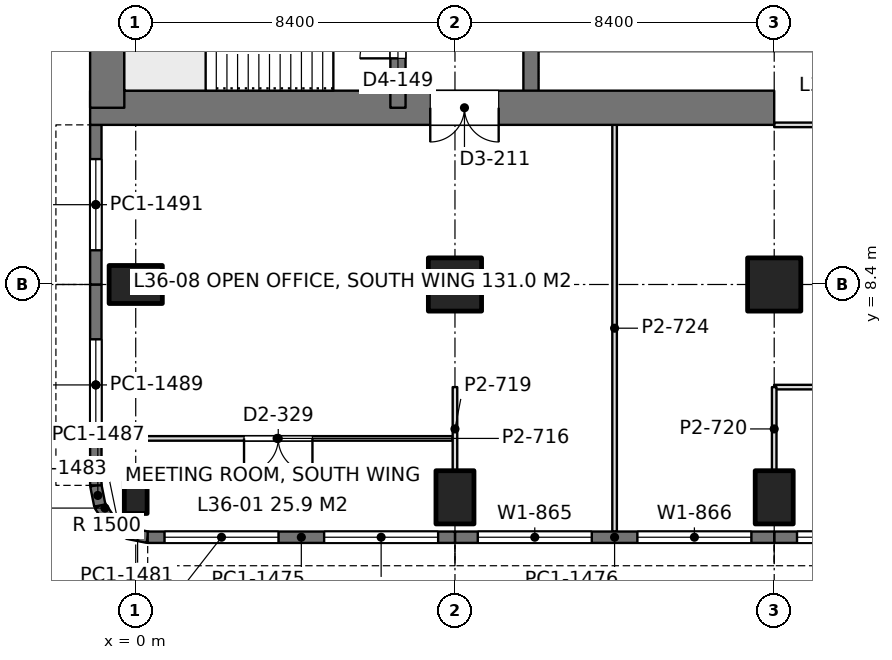
"""IFC4 building model, lengths in metres.
Left out: names, types, materials, properties, quantities, classifications, styles, units other than length and angle.
Written with IfcOpenShell. Run it as: python <this file> out.ifc"""

import sys

from ifc_helpers import new_model, si_unit, direction, frame, frame_2d, origin, origin_2d, place, context, subcontext, project, spatial, rectangle, extrude, element, fill, save


model = new_model("IFC4")
c1 = context("Model", 3, precision=1e-05, world=origin(), true_north=direction((0.0, 1.0)))
c2 = subcontext(c1, "Body", "Model", "MODEL_VIEW")
j1 = project(units=[si_unit("LENGTHUNIT", "METRE"), si_unit("PLANEANGLEUNIT", "RADIAN")], contexts=[c1])
p1 = place(None, origin())
s1 = spatial("IfcSite", under=j1, at=p1, CompositionType="ELEMENT")
p2 = place(p1, origin())
s2 = spatial("IfcBuilding", under=s1, at=p2, CompositionType="ELEMENT")
p3 = place(p2, frame((0.0, 0.0, 159.6)))
s3 = spatial("IfcBuildingStorey", under=s2, at=p3, CompositionType="ELEMENT", Elevation=159.6)
p4 = place(p3, frame((0.0, 2.8, 0.0), z_axis=(0.0, 0.0, 1.0), x_axis=(1.0, 0.0, 0.0)))
e1 = element("IfcColumn", 1, at=p4, inside=s3, PredefinedType="COLUMN", context=c2, shape_type="SweptSolid", body=[
    extrude(rectangle(XDim=0.6, YDim=0.85, at=origin_2d()), origin(), (0.0, 0.0, 1.0), 4.2),
])
for number, where, z_axis, x_axis in (
    (2, (0.0, 8.4, 0.0), (0.0, 0.0, 1.0), (0.0, 1.0, 0.0)),
    (3, (8.4, 2.8, 0.0), (0.0, 0.0, 1.0), (1.0, 0.0, 0.0)),
):
    element("IfcColumn", number, at=place(p3, frame(where, z_axis=z_axis, x_axis=x_axis)), inside=s3, PredefinedType="COLUMN", context=c2, shape_type="SweptSolid", body=[
        extrude(rectangle(XDim=1.0, YDim=1.4, at=origin_2d()), origin(), (0.0, 0.0, 1.0), 4.2),
    ])
p5 = place(p3, frame((8.4, 8.4, 0.0), z_axis=(0.0, 0.0, 1.0), x_axis=(1.0, 0.0, 0.0)))
e4 = element("IfcColumn", 4, at=p5, inside=s3, PredefinedType="COLUMN", context=c2, shape_type="SweptSolid", body=[
    extrude(rectangle(XDim=1.4, YDim=1.4, at=origin_2d()), origin(), (0.0, 0.0, 1.0), 4.2),
])
p6 = place(p3, frame((16.8, 2.8, 0.0), z_axis=(0.0, 0.0, 1.0), x_axis=(1.0, 0.0, 0.0)))
e5 = element("IfcColumn", 5, at=p6, inside=s3, PredefinedType="COLUMN", context=c2, shape_type="SweptSolid", body=[
    extrude(rectangle(XDim=1.0, YDim=1.4, at=origin_2d()), origin(), (0.0, 0.0, 1.0), 4.2),
])
p7 = place(p3, frame((16.8, 8.4, 0.0), z_axis=(0.0, 0.0, 1.0), x_axis=(1.0, 0.0, 0.0)))
e6 = element("IfcColumn", 6, at=p7, inside=s3, PredefinedType="COLUMN", context=c2, shape_type="SweptSolid", body=[
    extrude(rectangle(XDim=1.4, YDim=1.4, at=origin_2d()), origin(), (0.0, 0.0, 1.0), 4.2),
])
p8 = place(p3, frame((-1.2, 13.05, 0.0), z_axis=(0.0, 0.0, 1.0), x_axis=(1.0, 0.0, 0.0)))
e7 = element("IfcWall", 7, at=p8, inside=s3, PredefinedType="SHEAR", context=c2, shape_type="SweptSolid", body=[
    extrude(rectangle(XDim=18.0, YDim=0.9, at=frame_2d((9.0, 0.0))), origin(), (0.0, 0.0, 1.0), 4.2),
])
p9 = place(p8, frame((8.95, 0.0, 0.0)))
e8 = element("IfcOpeningElement", 8, at=p9, cuts=e7, PredefinedType="OPENING", context=c2, shape_type="SweptSolid", body=[
    extrude(rectangle(XDim=1.8, YDim=2.4, at=frame_2d((0.9, 1.2))), frame((0.0, 0.46, 0.0), z_axis=(0.0, -1.0, 0.0), x_axis=(1.0, 0.0, 0.0)), (0.0, 0.0, 1.0), 0.92),
])
p10 = place(p3, frame((-0.75, 13.05, 0.0), z_axis=(0.0, 0.0, 1.0), x_axis=(0.0, 1.0, 0.0)))
e9 = element("IfcWall", 9, at=p10, inside=s3, PredefinedType="SHEAR", context=c2, shape_type="SweptSolid", body=[
    extrude(rectangle(XDim=24.3, YDim=0.9, at=frame_2d((12.15, 0.0))), origin(), (0.0, 0.0, 1.0), 4.2),
])
p11 = place(p3, frame((6.9, 13.05, 0.0), z_axis=(0.0, 0.0, 1.0), x_axis=(0.0, 1.0, 0.0)))
e10 = element("IfcWall", 10, at=p11, inside=s3, PredefinedType="SHEAR", context=c2, shape_type="SweptSolid", body=[
    extrude(rectangle(XDim=24.3, YDim=0.4, at=frame_2d((12.15, 0.0))), origin(), (0.0, 0.0, 1.0), 4.2),
])
p12 = place(p11, frame((1.3, 0.0, 0.0)))
e11 = element("IfcOpeningElement", 11, at=p12, cuts=e10, PredefinedType="OPENING", context=c2, shape_type="SweptSolid", body=[
    extrude(rectangle(XDim=1.0, YDim=2.2, at=frame_2d((0.5, 1.1))), frame((0.0, 0.21, 0.0), z_axis=(0.0, -1.0, 0.0), x_axis=(1.0, 0.0, 0.0)), (0.0, 0.0, 1.0), 0.42),
])
p13 = place(p11, frame((22.0, 0.0, 0.0)))
e12 = element("IfcOpeningElement", 12, at=p13, cuts=e10, PredefinedType="OPENING", context=c2, shape_type="SweptSolid", body=[
    extrude(rectangle(XDim=1.0, YDim=2.2, at=frame_2d((0.5, 1.1))), frame((0.0, 0.21, 0.0), z_axis=(0.0, -1.0, 0.0), x_axis=(1.0, 0.0, 0.0)), (0.0, 0.0, 1.0), 0.42),
])
p14 = place(p11, frame((5.55, 0.0, 0.0)))
e13 = element("IfcOpeningElement", 13, at=p14, cuts=e10, PredefinedType="OPENING", context=c2, shape_type="SweptSolid", body=[
    extrude(rectangle(XDim=1.0, YDim=2.2, at=frame_2d((0.5, 1.1))), frame((0.0, 0.21, 0.0), z_axis=(0.0, -1.0, 0.0), x_axis=(1.0, 0.0, 0.0)), (0.0, 0.0, 1.0), 0.42),
])
p15 = place(p11, frame((9.55, 0.0, 0.0)))
e14 = element("IfcOpeningElement", 14, at=p15, cuts=e10, PredefinedType="OPENING", context=c2, shape_type="SweptSolid", body=[
    extrude(rectangle(XDim=1.0, YDim=2.2, at=frame_2d((0.5, 1.1))), frame((0.0, 0.21, 0.0), z_axis=(0.0, -1.0, 0.0), x_axis=(1.0, 0.0, 0.0)), (0.0, 0.0, 1.0), 0.42),
])
p16 = place(p11, frame((12.8, 0.0, 0.0)))
e15 = element("IfcOpeningElement", 15, at=p16, cuts=e10, PredefinedType="OPENING", context=c2, shape_type="SweptSolid", body=[
    extrude(rectangle(XDim=1.1, YDim=2.2, at=frame_2d((0.55, 1.1))), frame((0.0, 0.21, 0.0), z_axis=(0.0, -1.0, 0.0), x_axis=(1.0, 0.0, 0.0)), (0.0, 0.0, 1.0), 0.42),
])
p17 = place(p11, frame((15.538, 0.0, 0.0)))
e16 = element("IfcOpeningElement", 16, at=p17, cuts=e10, PredefinedType="OPENING", context=c2, shape_type="SweptSolid", body=[
    extrude(rectangle(XDim=1.1, YDim=2.2, at=frame_2d((0.55, 1.1))), frame((0.0, 0.21, 0.0), z_axis=(0.0, -1.0, 0.0), x_axis=(1.0, 0.0, 0.0)), (0.0, 0.0, 1.0), 0.42),
])
p18 = place(p11, frame((18.262, 0.0, 0.0)))
e17 = element("IfcOpeningElement", 17, at=p18, cuts=e10, PredefinedType="OPENING", context=c2, shape_type="SweptSolid", body=[
    extrude(rectangle(XDim=1.1, YDim=2.2, at=frame_2d((0.55, 1.1))), frame((0.0, 0.21, 0.0), z_axis=(0.0, -1.0, 0.0), x_axis=(1.0, 0.0, 0.0)), (0.0, 0.0, 1.0), 0.42),
])
p19 = place(p3, frame((10.4, 13.05, 0.0), z_axis=(0.0, 0.0, 1.0), x_axis=(0.0, 1.0, 0.0)))
e18 = element("IfcWall", 18, at=p19, inside=s3, PredefinedType="SHEAR", context=c2, shape_type="SweptSolid", body=[
    extrude(rectangle(XDim=24.3, YDim=0.4, at=frame_2d((12.15, 0.0))), origin(), (0.0, 0.0, 1.0), 4.2),
])
p20 = place(p19, frame((10.05, 0.0, 0.0)))
e19 = element("IfcOpeningElement", 19, at=p20, cuts=e18, PredefinedType="OPENING", context=c2, shape_type="SweptSolid", body=[
    extrude(rectangle(XDim=1.1, YDim=2.2, at=frame_2d((0.55, 1.1))), frame((0.0, 0.21, 0.0), z_axis=(0.0, -1.0, 0.0), x_axis=(1.0, 0.0, 0.0)), (0.0, 0.0, 1.0), 0.42),
])
p21 = place(p19, frame((12.9, 0.0, 0.0)))
e20 = element("IfcOpeningElement", 20, at=p21, cuts=e18, PredefinedType="OPENING", context=c2, shape_type="SweptSolid", body=[
    extrude(rectangle(XDim=1.1, YDim=2.2, at=frame_2d((0.55, 1.1))), frame((0.0, 0.21, 0.0), z_axis=(0.0, -1.0, 0.0), x_axis=(1.0, 0.0, 0.0)), (0.0, 0.0, 1.0), 0.42),
])
p22 = place(p19, frame((21.45, 0.0, 0.0)))
e21 = element("IfcOpeningElement", 21, at=p22, cuts=e18, PredefinedType="OPENING", context=c2, shape_type="SweptSolid", body=[
    extrude(rectangle(XDim=1.1, YDim=2.2, at=frame_2d((0.55, 1.1))), frame((0.0, 0.21, 0.0), z_axis=(0.0, -1.0, 0.0), x_axis=(1.0, 0.0, 0.0)), (0.0, 0.0, 1.0), 0.42),
])
p23 = place(p19, frame((2.05, 0.0, 0.0)))
e22 = element("IfcOpeningElement", 22, at=p23, cuts=e18, PredefinedType="OPENING", context=c2, shape_type="SweptSolid", body=[
    extrude(rectangle(XDim=1.8, YDim=2.4, at=frame_2d((0.9, 1.2))), frame((0.0, 0.21, 0.0), z_axis=(0.0, -1.0, 0.0), x_axis=(1.0, 0.0, 0.0)), (0.0, 0.0, 1.0), 0.42),
])
p24 = place(p19, frame((5.8, 0.0, 0.0)))
e23 = element("IfcOpeningElement", 23, at=p24, cuts=e18, PredefinedType="OPENING", context=c2, shape_type="SweptSolid", body=[
    extrude(rectangle(XDim=1.8, YDim=2.4, at=frame_2d((0.9, 1.2))), frame((0.0, 0.21, 0.0), z_axis=(0.0, -1.0, 0.0), x_axis=(1.0, 0.0, 0.0)), (0.0, 0.0, 1.0), 0.42),
])
p25 = place(p3, frame((25.2, 1.75, 0.0), z_axis=(0.0, 0.0, 1.0), x_axis=(-1.0, 0.0, 0.0)))
e24 = element("IfcWall", 24, at=p25, inside=s3, PredefinedType="SOLIDWALL", context=c2, shape_type="SweptSolid", body=[
    extrude(rectangle(XDim=8.4, YDim=0.3, at=frame_2d((4.2, 0.0))), origin(), (0.0, 0.0, 1.0), 4.05),
])
p26 = place(p25, frame((0.6, 0.0, 0.9)))
e25 = element("IfcOpeningElement", 25, at=p26, cuts=e24, PredefinedType="OPENING", context=c2, shape_type="SweptSolid", body=[
    extrude(rectangle(XDim=3.0, YDim=1.9, at=frame_2d((1.5, 0.95))), frame((0.0, 0.16, 0.0), z_axis=(0.0, -1.0, 0.0), x_axis=(1.0, 0.0, 0.0)), (0.0, 0.0, 1.0), 0.32),
])
p27 = place(p25, frame((4.8, 0.0, 0.9)))
e26 = element("IfcOpeningElement", 26, at=p27, cuts=e24, PredefinedType="OPENING", context=c2, shape_type="SweptSolid", body=[
    extrude(rectangle(XDim=3.0, YDim=1.9, at=frame_2d((1.5, 0.95))), frame((0.0, 0.16, 0.0), z_axis=(0.0, -1.0, 0.0), x_axis=(1.0, 0.0, 0.0)), (0.0, 0.0, 1.0), 0.32),
])
p28 = place(p3, frame((16.8, 1.75, 0.0), z_axis=(0.0, 0.0, 1.0), x_axis=(-1.0, 0.0, 0.0)))
e27 = element("IfcWall", 27, at=p28, inside=s3, PredefinedType="SOLIDWALL", context=c2, shape_type="SweptSolid", body=[
    extrude(rectangle(XDim=8.4, YDim=0.3, at=frame_2d((4.2, 0.0))), origin(), (0.0, 0.0, 1.0), 4.05),
])
p29 = place(p28, frame((0.6, 0.0, 0.9)))
e28 = element("IfcOpeningElement", 28, at=p29, cuts=e27, PredefinedType="OPENING", context=c2, shape_type="SweptSolid", body=[
    extrude(rectangle(XDim=3.0, YDim=1.9, at=frame_2d((1.5, 0.95))), frame((0.0, 0.16, 0.0), z_axis=(0.0, -1.0, 0.0), x_axis=(1.0, 0.0, 0.0)), (0.0, 0.0, 1.0), 0.32),
])
p30 = place(p28, frame((4.8, 0.0, 0.9)))
e29 = element("IfcOpeningElement", 29, at=p30, cuts=e27, PredefinedType="OPENING", context=c2, shape_type="SweptSolid", body=[
    extrude(rectangle(XDim=3.0, YDim=1.9, at=frame_2d((1.5, 0.95))), frame((0.0, 0.16, 0.0), z_axis=(0.0, -1.0, 0.0), x_axis=(1.0, 0.0, 0.0)), (0.0, 0.0, 1.0), 0.32),
])
p31 = place(p3, frame((8.4, 1.75, 0.0), z_axis=(0.0, 0.0, 1.0), x_axis=(-1.0, 0.0, 0.0)))
e30 = element("IfcWall", 30, at=p31, inside=s3, PredefinedType="SOLIDWALL", context=c2, shape_type="SweptSolid", body=[
    extrude(rectangle(XDim=8.085, YDim=0.3, at=frame_2d((4.042, 0.0))), origin(), (0.0, 0.0, 1.0), 4.05),
])
p32 = place(p31, frame((0.443, 0.0, 0.9)))
e31 = element("IfcOpeningElement", 31, at=p32, cuts=e30, PredefinedType="OPENING", context=c2, shape_type="SweptSolid", body=[
    extrude(rectangle(XDim=3.0, YDim=1.9, at=frame_2d((1.5, 0.95))), frame((0.0, 0.16, 0.0), z_axis=(0.0, -1.0, 0.0), x_axis=(1.0, 0.0, 0.0)), (0.0, 0.0, 1.0), 0.32),
])
p33 = place(p31, frame((4.643, 0.0, 0.9)))
e32 = element("IfcOpeningElement", 32, at=p33, cuts=e30, PredefinedType="OPENING", context=c2, shape_type="SweptSolid", body=[
    extrude(rectangle(XDim=3.0, YDim=1.9, at=frame_2d((1.5, 0.95))), frame((0.0, 0.16, 0.0), z_axis=(0.0, -1.0, 0.0), x_axis=(1.0, 0.0, 0.0)), (0.0, 0.0, 1.0), 0.32),
])
p34 = place(p3, frame((0.315, 1.75, 0.0), z_axis=(0.0, 0.0, 1.0), x_axis=(-0.980788534345, 0.195073962632, 0.0)))
e33 = element("IfcWall", 33, at=p34, inside=s3, PredefinedType="SOLIDWALL", context=c2, shape_type="SweptSolid", body=[
    extrude(rectangle(XDim=0.541, YDim=0.3, at=frame_2d((0.271, 0.0))), origin(), (0.0, 0.0, 1.0), 4.05),
])
for number, where, z_axis, x_axis in (
    (34, (-0.216, 1.855, 0.0), (0.0, 0.0, 1.0), (-0.831, 0.556, 0.0)),
    (35, (-0.653, 2.147, 0.0), (0.0, 0.0, 1.0), (-0.556, 0.831, 0.0)),
):
    element("IfcWall", number, at=place(p3, frame(where, z_axis=z_axis, x_axis=x_axis)), inside=s3, PredefinedType="SOLIDWALL", context=c2, shape_type="SweptSolid", body=[
        extrude(rectangle(XDim=0.526, YDim=0.3, at=frame_2d((0.263, 0.0))), origin(), (0.0, 0.0, 1.0), 4.05),
    ])
p35 = place(p3, frame((-0.945, 2.584, 0.0), z_axis=(0.0, 0.0, 1.0), x_axis=(-0.195073962632, 0.980788534345, 0.0)))
e36 = element("IfcWall", 36, at=p35, inside=s3, PredefinedType="SOLIDWALL", context=c2, shape_type="SweptSolid", body=[
    extrude(rectangle(XDim=0.541, YDim=0.3, at=frame_2d((0.271, 0.0))), origin(), (0.0, 0.0, 1.0), 4.05),
])
p36 = place(p3, frame((-1.05, 3.115, 0.0), z_axis=(0.0, 0.0, 1.0), x_axis=(0.0, 1.0, 0.0)))
e37 = element("IfcWall", 37, at=p36, inside=s3, PredefinedType="SOLIDWALL", context=c2, shape_type="SweptSolid", body=[
    extrude(rectangle(XDim=5.285, YDim=0.3, at=frame_2d((2.643, 0.0))), origin(), (0.0, 0.0, 1.0), 4.05),
])
p37 = place(p36, frame((1.443, 0.0, 0.9)))
e38 = element("IfcOpeningElement", 38, at=p37, cuts=e37, PredefinedType="OPENING", context=c2, shape_type="SweptSolid", body=[
    extrude(rectangle(XDim=2.4, YDim=1.9, at=frame_2d((1.2, 0.95))), frame((0.0, 0.16, 0.0), z_axis=(0.0, -1.0, 0.0), x_axis=(1.0, 0.0, 0.0)), (0.0, 0.0, 1.0), 0.32),
])
p38 = place(p3, frame((-1.05, 8.4, 0.0), z_axis=(0.0, 0.0, 1.0), x_axis=(0.0, 1.0, 0.0)))
e39 = element("IfcWall", 39, at=p38, inside=s3, PredefinedType="SOLIDWALL", context=c2, shape_type="SweptSolid", body=[
    extrude(rectangle(XDim=4.2, YDim=0.3, at=frame_2d((2.1, 0.0))), origin(), (0.0, 0.0, 1.0), 4.05),
])
p39 = place(p38, frame((0.9, 0.0, 0.9)))
e40 = element("IfcOpeningElement", 40, at=p39, cuts=e39, PredefinedType="OPENING", context=c2, shape_type="SweptSolid", body=[
    extrude(rectangle(XDim=2.4, YDim=1.9, at=frame_2d((1.2, 0.95))), frame((0.0, 0.16, 0.0), z_axis=(0.0, -1.0, 0.0), x_axis=(1.0, 0.0, 0.0)), (0.0, 0.0, 1.0), 0.32),
])
p40 = place(p3, frame((-0.902, 4.35, 0.0), z_axis=(0.0, 0.0, 1.0), x_axis=(1.0, 0.0, 0.0)))
e41 = element("IfcWall", 41, at=p40, inside=s3, PredefinedType="PARTITIONING", context=c2, shape_type="SweptSolid", body=[
    extrude(rectangle(XDim=9.244, YDim=0.12, at=frame_2d((4.622, 0.0))), origin(), (0.0, 0.0, 1.0), 3.55),
])
p41 = place(p40, frame((3.752, 0.0, 0.0)))
e42 = element("IfcOpeningElement", 42, at=p41, cuts=e41, PredefinedType="OPENING", context=c2, shape_type="SweptSolid", body=[
    extrude(rectangle(XDim=1.8, YDim=2.2, at=frame_2d((0.9, 1.1))), frame((0.0, 0.07, 0.0), z_axis=(0.0, -1.0, 0.0), x_axis=(1.0, 0.0, 0.0)), (0.0, 0.0, 1.0), 0.14),
])
p42 = place(p3, frame((8.4, 3.499, 0.0), z_axis=(0.0, 0.0, 1.0), x_axis=(0.0, 1.0, 0.0)))
e43 = element("IfcWall", 43, at=p42, inside=s3, PredefinedType="PARTITIONING", context=c2, shape_type="SweptSolid", body=[
    extrude(rectangle(XDim=2.201, YDim=0.12, at=frame_2d((1.101, 0.0))), origin(), (0.0, 0.0, 1.0), 3.55),
])
p43 = place(p3, frame((16.8, 5.7, 0.0), z_axis=(0.0, 0.0, 1.0), x_axis=(1.0, 0.0, 0.0)))
e44 = element("IfcWall", 44, at=p43, inside=s3, PredefinedType="PARTITIONING", context=c2, shape_type="SweptSolid", body=[
    extrude(rectangle(XDim=16.8, YDim=0.12, at=frame_2d((8.4, 0.0))), origin(), (0.0, 0.0, 1.0), 3.55),
])
p44 = place(p43, frame((1.6, 0.0, 0.0)))
e45 = element("IfcOpeningElement", 45, at=p44, cuts=e44, PredefinedType="OPENING", context=c2, shape_type="SweptSolid", body=[
    extrude(rectangle(XDim=1.0, YDim=2.4, at=frame_2d((0.5, 1.2))), frame((0.0, 0.07, 0.0), z_axis=(0.0, -1.0, 0.0), x_axis=(1.0, 0.0, 0.0)), (0.0, 0.0, 1.0), 0.14),
])
p45 = place(p43, frame((5.8, 0.0, 0.0)))
e46 = element("IfcOpeningElement", 46, at=p45, cuts=e44, PredefinedType="OPENING", context=c2, shape_type="SweptSolid", body=[
    extrude(rectangle(XDim=1.0, YDim=2.4, at=frame_2d((0.5, 1.2))), frame((0.0, 0.07, 0.0), z_axis=(0.0, -1.0, 0.0), x_axis=(1.0, 0.0, 0.0)), (0.0, 0.0, 1.0), 0.14),
])
p46 = place(p43, frame((10.0, 0.0, 0.0)))
e47 = element("IfcOpeningElement", 47, at=p46, cuts=e44, PredefinedType="OPENING", context=c2, shape_type="SweptSolid", body=[
    extrude(rectangle(XDim=1.0, YDim=2.4, at=frame_2d((0.5, 1.2))), frame((0.0, 0.07, 0.0), z_axis=(0.0, -1.0, 0.0), x_axis=(1.0, 0.0, 0.0)), (0.0, 0.0, 1.0), 0.14),
])
p47 = place(p43, frame((14.2, 0.0, 0.0)))
e48 = element("IfcOpeningElement", 48, at=p47, cuts=e44, PredefinedType="OPENING", context=c2, shape_type="SweptSolid", body=[
    extrude(rectangle(XDim=1.0, YDim=2.4, at=frame_2d((0.5, 1.2))), frame((0.0, 0.07, 0.0), z_axis=(0.0, -1.0, 0.0), x_axis=(1.0, 0.0, 0.0)), (0.0, 0.0, 1.0), 0.14),
])
p48 = place(p3, frame((16.8, 3.499, 0.0), z_axis=(0.0, 0.0, 1.0), x_axis=(0.0, 1.0, 0.0)))
e49 = element("IfcWall", 49, at=p48, inside=s3, PredefinedType="PARTITIONING", context=c2, shape_type="SweptSolid", body=[
    extrude(rectangle(XDim=2.201, YDim=0.12, at=frame_2d((1.101, 0.0))), origin(), (0.0, 0.0, 1.0), 3.55),
])
p49 = place(p3, frame((12.6, 1.898, 0.0), z_axis=(0.0, 0.0, 1.0), x_axis=(0.0, 1.0, 0.0)))
e50 = element("IfcWall", 50, at=p49, inside=s3, PredefinedType="PARTITIONING", context=c2, shape_type="SweptSolid", body=[
    extrude(rectangle(XDim=10.704, YDim=0.12, at=frame_2d((5.352, 0.0))), origin(), (0.0, 0.0, 1.0), 3.55),
])
p50 = place(p3, frame((16.8, 12.6, 0.0), z_axis=(0.0, 0.0, 1.0), x_axis=(1.0, 0.0, 0.0)))
e51 = element("IfcWall", 51, at=p50, inside=s3, PredefinedType="PARTITIONING", context=c2, shape_type="SweptSolid", body=[
    extrude(rectangle(XDim=16.8, YDim=0.12, at=frame_2d((8.4, 0.0))), origin(), (0.0, 0.0, 1.0), 3.55),
])
p51 = place(p27, origin())
e52 = element("IfcWindow", 52, at=p51, inside=s3, PartitioningType="SINGLE_PANEL", PredefinedType="WINDOW", context=c2, shape_type="SweptSolid", body=[
    extrude(rectangle(XDim=3.0, YDim=1.9, at=frame_2d((1.5, 0.95))), frame((0.0, 0.03, 0.0), z_axis=(0.0, -1.0, 0.0), x_axis=(1.0, 0.0, 0.0)), (0.0, 0.0, 1.0), 0.06),
])
fill(e26, e52)
p52 = place(p29, origin())
e53 = element("IfcWindow", 53, at=p52, inside=s3, PartitioningType="SINGLE_PANEL", PredefinedType="WINDOW", context=c2, shape_type="SweptSolid", body=[
    extrude(rectangle(XDim=3.0, YDim=1.9, at=frame_2d((1.5, 0.95))), frame((0.0, 0.03, 0.0), z_axis=(0.0, -1.0, 0.0), x_axis=(1.0, 0.0, 0.0)), (0.0, 0.0, 1.0), 0.06),
])
fill(e28, e53)
p53 = place(p30, origin())
e54 = element("IfcWindow", 54, at=p53, inside=s3, PartitioningType="SINGLE_PANEL", PredefinedType="WINDOW", context=c2, shape_type="SweptSolid", body=[
    extrude(rectangle(XDim=3.0, YDim=1.9, at=frame_2d((1.5, 0.95))), frame((0.0, 0.03, 0.0), z_axis=(0.0, -1.0, 0.0), x_axis=(1.0, 0.0, 0.0)), (0.0, 0.0, 1.0), 0.06),
])
fill(e29, e54)
p54 = place(p32, origin())
e55 = element("IfcWindow", 55, at=p54, inside=s3, PartitioningType="SINGLE_PANEL", PredefinedType="WINDOW", context=c2, shape_type="SweptSolid", body=[
    extrude(rectangle(XDim=3.0, YDim=1.9, at=frame_2d((1.5, 0.95))), frame((0.0, 0.03, 0.0), z_axis=(0.0, -1.0, 0.0), x_axis=(1.0, 0.0, 0.0)), (0.0, 0.0, 1.0), 0.06),
])
fill(e31, e55)
p55 = place(p33, origin())
e56 = element("IfcWindow", 56, at=p55, inside=s3, PartitioningType="SINGLE_PANEL", PredefinedType="WINDOW", context=c2, shape_type="SweptSolid", body=[
    extrude(rectangle(XDim=3.0, YDim=1.9, at=frame_2d((1.5, 0.95))), frame((0.0, 0.03, 0.0), z_axis=(0.0, -1.0, 0.0), x_axis=(1.0, 0.0, 0.0)), (0.0, 0.0, 1.0), 0.06),
])
fill(e32, e56)
p56 = place(p37, origin())
e57 = element("IfcWindow", 57, at=p56, inside=s3, PartitioningType="SINGLE_PANEL", PredefinedType="WINDOW", context=c2, shape_type="SweptSolid", body=[
    extrude(rectangle(XDim=2.4, YDim=1.9, at=frame_2d((1.2, 0.95))), frame((0.0, 0.03, 0.0), z_axis=(0.0, -1.0, 0.0), x_axis=(1.0, 0.0, 0.0)), (0.0, 0.0, 1.0), 0.06),
])
fill(e38, e57)
p57 = place(p39, origin())
e58 = element("IfcWindow", 58, at=p57, inside=s3, PartitioningType="SINGLE_PANEL", PredefinedType="WINDOW", context=c2, shape_type="SweptSolid", body=[
    extrude(rectangle(XDim=2.4, YDim=1.9, at=frame_2d((1.2, 0.95))), frame((0.0, 0.03, 0.0), z_axis=(0.0, -1.0, 0.0), x_axis=(1.0, 0.0, 0.0)), (0.0, 0.0, 1.0), 0.06),
])
fill(e40, e58)
p58 = place(p9, frame((1.8, 0.0, 0.0), z_axis=(0.0, 0.0, 1.0), x_axis=(-1.0, 0.0, 0.0)))
e59 = element("IfcDoor", 59, at=p58, inside=s3, OperationType="DOUBLE_DOOR_SINGLE_SWING", PredefinedType="DOOR", context=c2, shape_type="SweptSolid", body=[
    extrude(rectangle(XDim=1.8, YDim=2.4, at=frame_2d((0.9, 1.2))), frame((0.0, 0.025, 0.0), z_axis=(0.0, -1.0, 0.0), x_axis=(1.0, 0.0, 0.0)), (0.0, 0.0, 1.0), 0.05),
])
fill(e8, e59)
p59 = place(p12, origin())
e60 = element("IfcDoor", 60, at=p59, inside=s3, OperationType="SINGLE_SWING_LEFT", PredefinedType="DOOR", context=c2, shape_type="SweptSolid", body=[
    extrude(rectangle(XDim=1.0, YDim=2.2, at=frame_2d((0.5, 1.1))), frame((0.0, 0.025, 0.0), z_axis=(0.0, -1.0, 0.0), x_axis=(1.0, 0.0, 0.0)), (0.0, 0.0, 1.0), 0.05),
])
fill(e11, e60)
p60 = place(p41, frame((1.8, 0.0, 0.0), z_axis=(0.0, 0.0, 1.0), x_axis=(-1.0, 0.0, 0.0)))
e61 = element("IfcDoor", 61, at=p60, inside=s3, OperationType="DOUBLE_DOOR_SINGLE_SWING", PredefinedType="DOOR", context=c2, shape_type="SweptSolid", body=[
    extrude(rectangle(XDim=1.8, YDim=2.2, at=frame_2d((0.9, 1.1))), frame((0.0, 0.025, 0.0), z_axis=(0.0, -1.0, 0.0), x_axis=(1.0, 0.0, 0.0)), (0.0, 0.0, 1.0), 0.05),
])
fill(e42, e61)
save(model, sys.argv[1])
